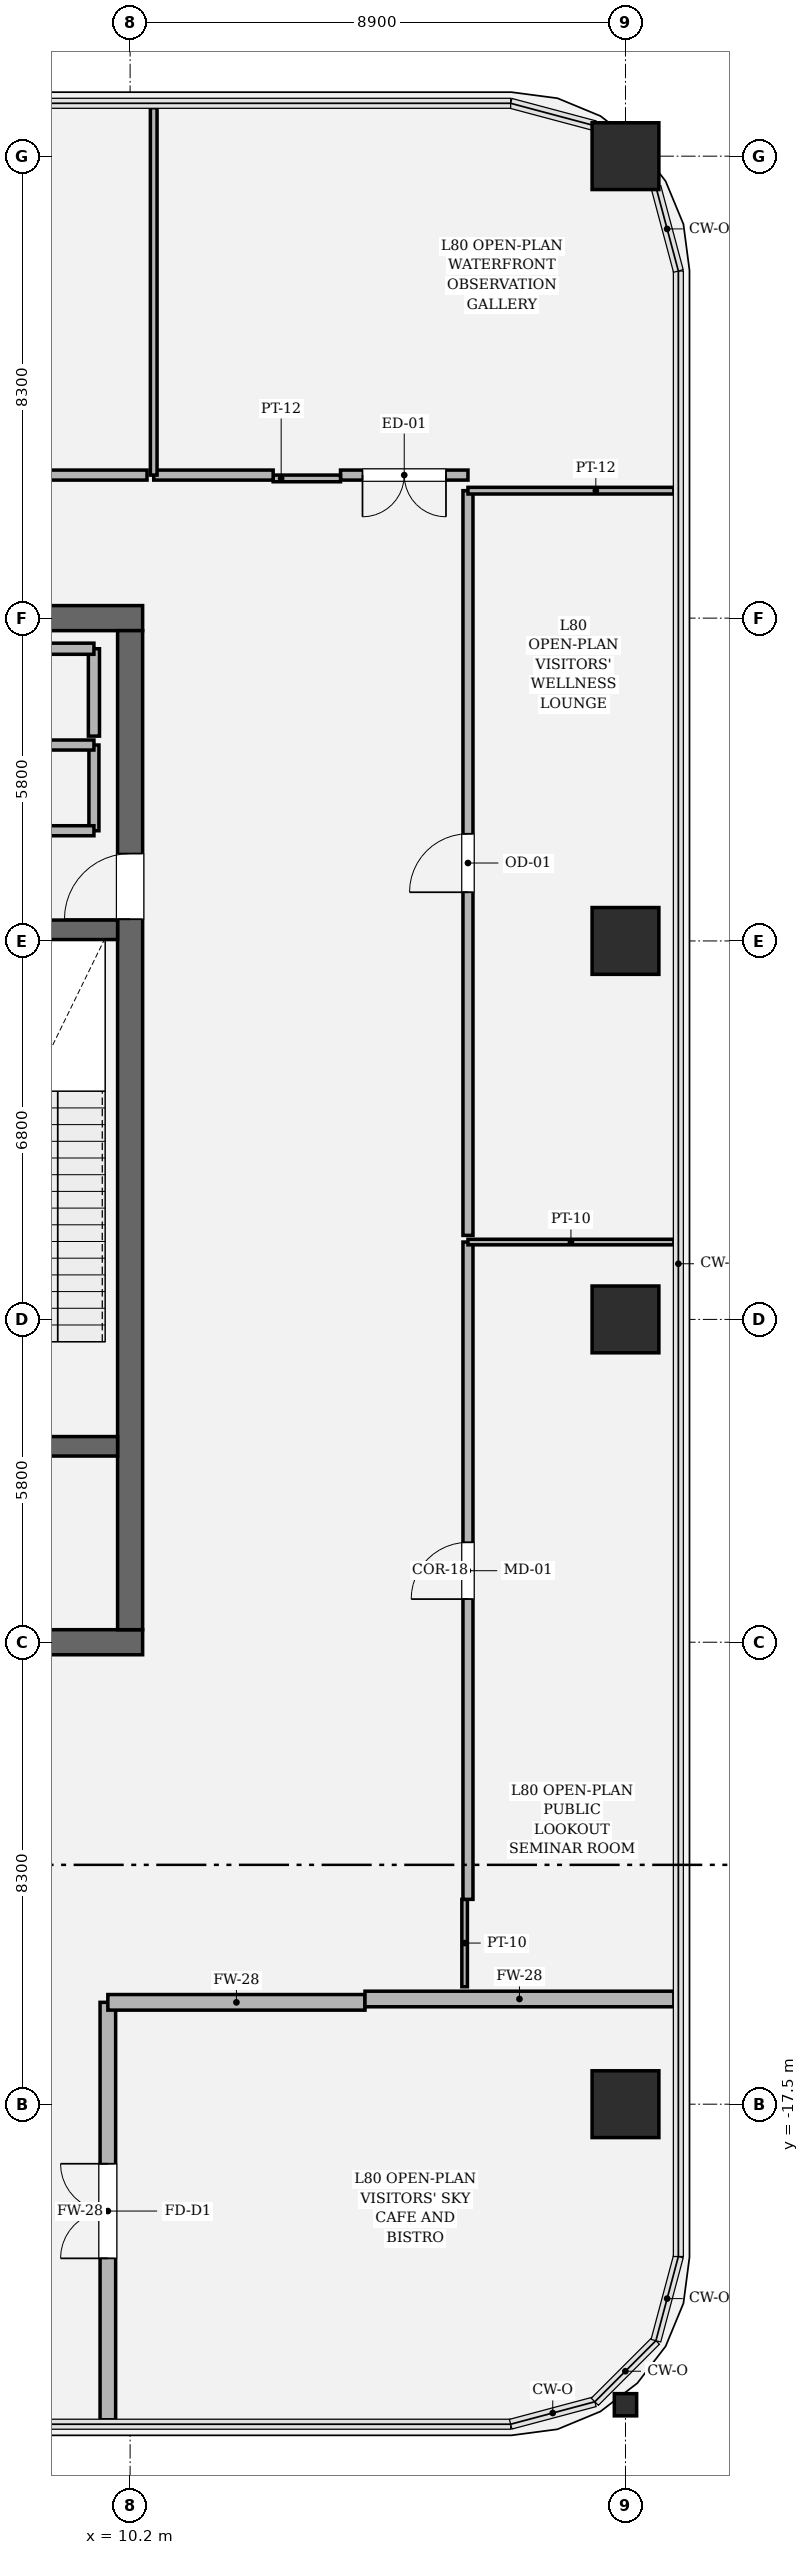
"""IFC4 building model, lengths in metres.
Left out: names, types, materials, properties, quantities, classifications, styles, units other than length and angle.
Written with IfcOpenShell. Run it as: python <this file> out.ifc"""

import sys

from ifc_helpers import new_model, si_unit, direction, frame, frame_2d, origin, origin_2d, place, context, subcontext, project, spatial, rectangle, hollow_rectangle, i_section, extrude, element, fill, save


model = new_model("IFC4")
c1 = context("Model", 3, precision=1e-05, world=origin(), true_north=direction((0.0, 1.0)))
c2 = subcontext(c1, "Body", "Model", "MODEL_VIEW")
j1 = project(units=[si_unit("LENGTHUNIT", "METRE"), si_unit("PLANEANGLEUNIT", "RADIAN")], contexts=[c1])
p1 = place(None, origin())
s1 = spatial("IfcSite", under=j1, at=p1, CompositionType="ELEMENT")
p2 = place(p1, origin())
s2 = spatial("IfcBuilding", under=s1, at=p2, CompositionType="ELEMENT")
p3 = place(p2, frame((0.0, 0.0, 339.0)))
s3 = spatial("IfcBuildingStorey", under=s2, at=p3, CompositionType="ELEMENT", Elevation=339.0)
p4 = place(p3, frame((10.425, -9.2, 0.0), z_axis=(0.0, 0.0, 1.0), x_axis=(-1.0, 0.0, 0.0)))
e1 = element("IfcWall", 1, at=p4, inside=s3, PredefinedType="SHEAR", context=c2, shape_type="SweptSolid", body=[
    extrude(rectangle(XDim=20.85, YDim=0.45, at=frame_2d((10.425, 0.0))), origin(), (0.0, 0.0, 1.0), 4.8),
])
p5 = place(p4, frame((2.7, 0.0, 0.0)))
e2 = element("IfcOpeningElement", 2, at=p5, cuts=e1, PredefinedType="OPENING", context=c2, shape_type="SweptSolid", body=[
    extrude(rectangle(XDim=1.25, YDim=2.25, at=frame_2d((0.625, 1.125))), frame((0.0, 0.235, 0.0), z_axis=(0.0, -1.0, 0.0), x_axis=(1.0, 0.0, 0.0)), (0.0, 0.0, 1.0), 0.47),
])
p6 = place(p4, frame((16.9, 0.0, 0.0)))
e3 = element("IfcOpeningElement", 3, at=p6, cuts=e1, PredefinedType="OPENING", context=c2, shape_type="SweptSolid", body=[
    extrude(rectangle(XDim=1.25, YDim=2.25, at=frame_2d((0.625, 1.125))), frame((0.0, 0.235, 0.0), z_axis=(0.0, -1.0, 0.0), x_axis=(1.0, 0.0, 0.0)), (0.0, 0.0, 1.0), 0.47),
])
p7 = place(p4, frame((10.925, 0.0, 0.0)))
e4 = element("IfcOpeningElement", 4, at=p7, cuts=e1, PredefinedType="OPENING", context=c2, shape_type="SweptSolid", body=[
    extrude(rectangle(XDim=1.2, YDim=2.3, at=frame_2d((0.6, 1.15))), frame((0.0, 0.235, 0.0), z_axis=(0.0, -1.0, 0.0), x_axis=(1.0, 0.0, 0.0)), (0.0, 0.0, 1.0), 0.47),
])
p8 = place(p4, frame((8.725, 0.0, 0.0)))
e5 = element("IfcOpeningElement", 5, at=p8, cuts=e1, PredefinedType="OPENING", context=c2, shape_type="SweptSolid", body=[
    extrude(rectangle(XDim=1.2, YDim=2.3, at=frame_2d((0.6, 1.15))), frame((0.0, 0.235, 0.0), z_axis=(0.0, -1.0, 0.0), x_axis=(1.0, 0.0, 0.0)), (0.0, 0.0, 1.0), 0.47),
])
p9 = place(p3, frame((-10.425, 9.2, 0.0), z_axis=(0.0, 0.0, 1.0), x_axis=(1.0, 0.0, 0.0)))
e6 = element("IfcWall", 6, at=p9, inside=s3, PredefinedType="SHEAR", context=c2, shape_type="SweptSolid", body=[
    extrude(rectangle(XDim=20.85, YDim=0.45, at=frame_2d((10.425, 0.0))), origin(), (0.0, 0.0, 1.0), 4.8),
])
p10 = place(p3, frame((10.2, 8.975, 0.0), z_axis=(0.0, 0.0, 1.0), x_axis=(0.0, -1.0, 0.0)))
e7 = element("IfcWall", 7, at=p10, inside=s3, PredefinedType="SHEAR", context=c2, shape_type="SweptSolid", body=[
    extrude(rectangle(XDim=17.95, YDim=0.45, at=frame_2d((8.975, 0.0))), origin(), (0.0, 0.0, 1.0), 4.8),
])
p11 = place(p10, frame((4.005, 0.0, 0.0)))
e8 = element("IfcOpeningElement", 8, at=p11, cuts=e7, PredefinedType="OPENING", context=c2, shape_type="SweptSolid", body=[
    extrude(rectangle(XDim=1.18, YDim=2.2, at=frame_2d((0.59, 1.1))), frame((0.0, 0.235, 0.0), z_axis=(0.0, -1.0, 0.0), x_axis=(1.0, 0.0, 0.0)), (0.0, 0.0, 1.0), 0.47),
])
p12 = place(p3, frame((4.65, -5.68, 0.0), z_axis=(0.0, 0.0, 1.0), x_axis=(1.0, 0.0, 0.0)))
e9 = element("IfcWall", 9, at=p12, inside=s3, PredefinedType="SOLIDWALL", context=c2, shape_type="SweptSolid", body=[
    extrude(rectangle(XDim=5.325, YDim=0.35, at=frame_2d((2.663, 0.0))), origin(), (0.0, 0.0, 1.0), 4.8),
])
p13 = place(p12, frame((2.71, 0.0, 0.0)))
e10 = element("IfcOpeningElement", 10, at=p13, cuts=e9, PredefinedType="OPENING", context=c2, shape_type="SweptSolid", body=[
    extrude(rectangle(XDim=1.18, YDim=2.2, at=frame_2d((0.59, 1.1))), frame((0.0, 0.185, 0.0), z_axis=(0.0, -1.0, 0.0), x_axis=(1.0, 0.0, 0.0)), (0.0, 0.0, 1.0), 0.37),
])
p14 = place(p3, frame((4.65, 3.6, 0.0), z_axis=(0.0, 0.0, 1.0), x_axis=(1.0, 0.0, 0.0)))
e11 = element("IfcWall", 11, at=p14, inside=s3, PredefinedType="SOLIDWALL", context=c2, shape_type="SweptSolid", body=[
    extrude(rectangle(XDim=5.325, YDim=0.35, at=frame_2d((2.663, 0.0))), origin(), (0.0, 0.0, 1.0), 4.8),
])
for number, where, z_axis, x_axis in (
    (12, (19.1, -17.5, 0.0), (0.0, 0.0, 1.0), (1.0, 0.0, 0.0)),
    (13, (19.1, -3.4, 0.0), (0.0, 0.0, 1.0), (1.0, 0.0, 0.0)),
    (14, (19.1, 3.4, 0.0), (0.0, 0.0, 1.0), (1.0, 0.0, 0.0)),
    (15, (19.1, 17.5, 0.0), (0.0, 0.0, 1.0), (1.0, 0.0, 0.0)),
):
    element("IfcColumn", number, at=place(p3, frame(where, z_axis=z_axis, x_axis=x_axis)), inside=s3, PredefinedType="COLUMN", context=c2, shape_type="SweptSolid", body=[
        extrude(hollow_rectangle(XDim=1.2, YDim=1.2, WallThickness=0.035, at=origin_2d()), origin(), (0.0, 0.0, 1.0), 4.8),
    ])
p15 = place(p3, frame((19.1, -22.9, 0.0), z_axis=(0.0, 0.0, 1.0), x_axis=(1.0, 0.0, 0.0)))
e16 = element("IfcColumn", 16, at=p15, inside=s3, PredefinedType="COLUMN", context=c2, shape_type="SweptSolid", body=[
    extrude(i_section(OverallWidth=0.401, OverallDepth=0.399, WebThickness=0.025, FlangeThickness=0.04, FilletRadius=0.018, at=origin_2d()), origin(), (0.0, 0.0, 1.0), 4.798),
])
p16 = place(p3, frame((9.55, 5.38, 0.0), z_axis=(0.0, 0.0, 1.0), x_axis=(0.0, 1.0, 0.0)))
e17 = element("IfcWall", 17, at=p16, inside=s3, PredefinedType="PARTITIONING", context=c2, shape_type="SweptSolid", body=[
    extrude(rectangle(XDim=1.54, YDim=0.18, at=frame_2d((0.77, 0.0))), origin(), (0.0, 0.0, 1.0), 4.52),
])
p17 = place(p3, frame((9.55, 6.92, 0.0), z_axis=(0.0, 0.0, 1.0), x_axis=(-1.0, 0.0, 0.0)))
e18 = element("IfcWall", 18, at=p17, inside=s3, PredefinedType="PARTITIONING", context=c2, shape_type="SweptSolid", body=[
    extrude(rectangle(XDim=4.5, YDim=0.18, at=frame_2d((2.25, 0.0))), origin(), (0.0, 0.0, 1.0), 4.52),
])
p18 = place(p17, frame((1.79, 0.0, 0.0)))
e19 = element("IfcOpeningElement", 19, at=p18, cuts=e18, PredefinedType="OPENING", context=c2, shape_type="SweptSolid", body=[
    extrude(rectangle(XDim=0.92, YDim=2.1, at=frame_2d((0.46, 1.05))), frame((0.0, 0.1, 0.0), z_axis=(0.0, -1.0, 0.0), x_axis=(1.0, 0.0, 0.0)), (0.0, 0.0, 1.0), 0.2),
])
p19 = place(p3, frame((5.05, 5.38, 0.0), z_axis=(0.0, 0.0, 1.0), x_axis=(1.0, 0.0, 0.0)))
e20 = element("IfcWall", 20, at=p19, inside=s3, PredefinedType="PARTITIONING", context=c2, shape_type="SweptSolid", body=[
    extrude(rectangle(XDim=4.5, YDim=0.18, at=frame_2d((2.25, 0.0))), origin(), (0.0, 0.0, 1.0), 4.52),
])
p20 = place(p19, frame((1.725, 0.0, 0.0)))
e21 = element("IfcOpeningElement", 21, at=p20, cuts=e20, PredefinedType="OPENING", context=c2, shape_type="SweptSolid", body=[
    extrude(rectangle(XDim=1.05, YDim=2.2, at=frame_2d((0.525, 1.1))), frame((0.0, 0.1, 0.0), z_axis=(0.0, -1.0, 0.0), x_axis=(1.0, 0.0, 0.0)), (0.0, 0.0, 1.0), 0.2),
])
p21 = place(p3, frame((9.55, 7.08, 0.0), z_axis=(0.0, 0.0, 1.0), x_axis=(0.0, 1.0, 0.0)))
e22 = element("IfcWall", 22, at=p21, inside=s3, PredefinedType="SOLIDWALL", context=c2, shape_type="SweptSolid", body=[
    extrude(rectangle(XDim=1.57, YDim=0.2, at=frame_2d((0.785, 0.0))), origin(), (0.0, 0.0, 1.0), 4.52),
])
p22 = place(p3, frame((9.55, 8.65, 0.0), z_axis=(0.0, 0.0, 1.0), x_axis=(-1.0, 0.0, 0.0)))
e23 = element("IfcWall", 23, at=p22, inside=s3, PredefinedType="SOLIDWALL", context=c2, shape_type="SweptSolid", body=[
    extrude(rectangle(XDim=4.5, YDim=0.2, at=frame_2d((2.25, 0.0))), origin(), (0.0, 0.0, 1.0), 4.52),
])
p23 = place(p3, frame((9.8, -23.17, 0.0), z_axis=(0.0, 0.0, 1.0), x_axis=(0.0, 1.0, 0.0)))
e24 = element("IfcWall", 24, at=p23, inside=s3, PredefinedType="SOLIDWALL", context=c2, shape_type="SweptSolid", body=[
    extrude(rectangle(XDim=7.5, YDim=0.28, at=frame_2d((3.75, 0.0))), origin(), (0.0, 0.0, 1.0), 3.194),
])
p24 = place(p23, frame((2.9, 0.0, 0.0)))
e25 = element("IfcOpeningElement", 25, at=p24, cuts=e24, PredefinedType="OPENING", context=c2, shape_type="SweptSolid", body=[
    extrude(rectangle(XDim=1.7, YDim=2.3, at=frame_2d((0.85, 1.15))), frame((0.0, 0.15, 0.0), z_axis=(0.0, -1.0, 0.0), x_axis=(1.0, 0.0, 0.0)), (0.0, 0.0, 1.0), 0.3),
])
p25 = place(p3, frame((9.8, -15.67, 0.0), z_axis=(0.0, 0.0, 1.0), x_axis=(1.0, 0.0, 0.0)))
e26 = element("IfcWall", 26, at=p25, inside=s3, PredefinedType="SOLIDWALL", context=c2, shape_type="SweptSolid", body=[
    extrude(rectangle(XDim=4.62, YDim=0.28, at=frame_2d((2.31, 0.0))), origin(), (0.0, 0.0, 1.0), 3.194),
])
p26 = place(p3, frame((14.42, -15.61, 0.0), z_axis=(0.0, 0.0, 1.0), x_axis=(1.0, 0.0, 0.0)))
e27 = element("IfcWall", 27, at=p26, inside=s3, PredefinedType="SOLIDWALL", context=c2, shape_type="SweptSolid", body=[
    extrude(rectangle(XDim=5.55, YDim=0.28, at=frame_2d((2.775, 0.0))), origin(), (0.0, 0.0, 1.0), 3.194),
])
p27 = place(p3, frame((16.21, -15.39, 0.0), z_axis=(0.0, 0.0, 1.0), x_axis=(0.0, 1.0, 0.0)))
e28 = element("IfcWall", 28, at=p27, inside=s3, PredefinedType="PARTITIONING", context=c2, shape_type="SweptSolid", body=[
    extrude(rectangle(XDim=1.57, YDim=0.1, at=frame_2d((0.785, 0.0))), origin(), (0.0, 0.0, 1.0), 4.52),
])
p28 = place(p3, frame((16.27, -13.82, 0.0), z_axis=(0.0, 0.0, 1.0), x_axis=(0.0, 1.0, 0.0)))
e29 = element("IfcWall", 29, at=p28, inside=s3, PredefinedType="PARTITIONING", context=c2, shape_type="SweptSolid", body=[
    extrude(rectangle(XDim=11.81, YDim=0.18, at=frame_2d((5.905, 0.0))), origin(), (0.0, 0.0, 1.0), 3.194),
])
p29 = place(p28, frame((5.395, 0.0, 0.0)))
e30 = element("IfcOpeningElement", 30, at=p29, cuts=e29, PredefinedType="OPENING", context=c2, shape_type="SweptSolid", body=[
    extrude(rectangle(XDim=1.02, YDim=2.2, at=frame_2d((0.51, 1.1))), frame((0.0, 0.1, 0.0), z_axis=(0.0, -1.0, 0.0), x_axis=(1.0, 0.0, 0.0)), (0.0, 0.0, 1.0), 0.2),
])
p30 = place(p3, frame((16.27, -2.01, 0.0), z_axis=(0.0, 0.0, 1.0), x_axis=(1.0, 0.0, 0.0)))
e31 = element("IfcWall", 31, at=p30, inside=s3, PredefinedType="PARTITIONING", context=c2, shape_type="SweptSolid", body=[
    extrude(rectangle(XDim=3.7, YDim=0.1, at=frame_2d((1.85, 0.0))), origin(), (0.0, 0.0, 1.0), 3.194),
])
p31 = place(p3, frame((16.27, -1.89, 0.0), z_axis=(0.0, 0.0, 1.0), x_axis=(0.0, 1.0, 0.0)))
e32 = element("IfcWall", 32, at=p31, inside=s3, PredefinedType="PARTITIONING", context=c2, shape_type="SweptSolid", body=[
    extrude(rectangle(XDim=13.38, YDim=0.18, at=frame_2d((6.69, 0.0))), origin(), (0.0, 0.0, 1.0), 3.194),
])
p32 = place(p31, frame((6.165, 0.0, 0.0)))
e33 = element("IfcOpeningElement", 33, at=p32, cuts=e32, PredefinedType="OPENING", context=c2, shape_type="SweptSolid", body=[
    extrude(rectangle(XDim=1.05, YDim=2.2, at=frame_2d((0.525, 1.1))), frame((0.0, 0.1, 0.0), z_axis=(0.0, -1.0, 0.0), x_axis=(1.0, 0.0, 0.0)), (0.0, 0.0, 1.0), 0.2),
])
p33 = place(p3, frame((16.27, 11.49, 0.0), z_axis=(0.0, 0.0, 1.0), x_axis=(1.0, 0.0, 0.0)))
e34 = element("IfcWall", 34, at=p33, inside=s3, PredefinedType="PARTITIONING", context=c2, shape_type="SweptSolid", body=[
    extrude(rectangle(XDim=3.7, YDim=0.12, at=frame_2d((1.85, 0.0))), origin(), (0.0, 0.0, 1.0), 3.194),
])
p34 = place(p3, frame((16.27, 11.77, 0.0), z_axis=(0.0, 0.0, 1.0), x_axis=(-1.0, 0.0, 0.0)))
e35 = element("IfcWall", 35, at=p34, inside=s3, PredefinedType="PARTITIONING", context=c2, shape_type="SweptSolid", body=[
    extrude(rectangle(XDim=2.29, YDim=0.18, at=frame_2d((1.145, 0.0))), origin(), (0.0, 0.0, 1.0), 4.52),
])
p35 = place(p34, frame((0.395, 0.0, 0.0)))
e36 = element("IfcOpeningElement", 36, at=p35, cuts=e35, PredefinedType="OPENING", context=c2, shape_type="SweptSolid", body=[
    extrude(rectangle(XDim=1.5, YDim=2.3, at=frame_2d((0.75, 1.15))), frame((0.0, 0.1, 0.0), z_axis=(0.0, -1.0, 0.0), x_axis=(1.0, 0.0, 0.0)), (0.0, 0.0, 1.0), 0.2),
])
p36 = place(p3, frame((13.98, 11.71, 0.0), z_axis=(0.0, 0.0, 1.0), x_axis=(-1.0, 0.0, 0.0)))
e37 = element("IfcWall", 37, at=p36, inside=s3, PredefinedType="PARTITIONING", context=c2, shape_type="SweptSolid", body=[
    extrude(rectangle(XDim=1.21, YDim=0.12, at=frame_2d((0.605, 0.0))), origin(), (0.0, 0.0, 1.0), 4.52),
])
p37 = place(p3, frame((12.77, 11.77, 0.0), z_axis=(0.0, 0.0, 1.0), x_axis=(-1.0, 0.0, 0.0)))
e38 = element("IfcWall", 38, at=p37, inside=s3, PredefinedType="PARTITIONING", context=c2, shape_type="SweptSolid", body=[
    extrude(rectangle(XDim=2.146, YDim=0.18, at=frame_2d((1.073, 0.0))), origin(), (0.0, 0.0, 1.0), 4.52),
])
p38 = place(p3, frame((10.624, 11.77, 0.0), z_axis=(0.0, 0.0, 1.0), x_axis=(0.0, 1.0, 0.0)))
e39 = element("IfcWall", 39, at=p38, inside=s3, PredefinedType="PARTITIONING", context=c2, shape_type="SweptSolid", body=[
    extrude(rectangle(XDim=6.6, YDim=0.12, at=frame_2d((3.3, 0.0))), origin(), (0.0, 0.0, 1.0), 3.194),
])
p39 = place(p3, frame((10.504, 11.77, 0.0), z_axis=(0.0, 0.0, 1.0), x_axis=(-1.0, 0.0, 0.0)))
e40 = element("IfcWall", 40, at=p39, inside=s3, PredefinedType="PARTITIONING", context=c2, shape_type="SweptSolid", body=[
    extrude(rectangle(XDim=12.844, YDim=0.18, at=frame_2d((6.422, 0.0))), origin(), (0.0, 0.0, 1.0), 3.194),
])
p40 = place(p39, frame((5.722, 0.0, 0.0)))
e41 = element("IfcOpeningElement", 41, at=p40, cuts=e40, PredefinedType="OPENING", context=c2, shape_type="SweptSolid", body=[
    extrude(rectangle(XDim=1.4, YDim=2.25, at=frame_2d((0.7, 1.125))), frame((0.0, 0.1, 0.0), z_axis=(0.0, -1.0, 0.0), x_axis=(1.0, 0.0, 0.0)), (0.0, 0.0, 1.0), 0.2),
])
p41 = place(p11, origin())
e42 = element("IfcDoor", 42, at=p41, inside=s3, OperationType="SINGLE_SWING_RIGHT", PredefinedType="DOOR", context=c2, shape_type="SweptSolid", body=[
    extrude(rectangle(XDim=1.18, YDim=2.2, at=frame_2d((0.59, 1.1))), frame((0.0, 0.025, 0.0), z_axis=(0.0, -1.0, 0.0), x_axis=(1.0, 0.0, 0.0)), (0.0, 0.0, 1.0), 0.05),
])
fill(e8, e42)
p42 = place(p24, origin())
e43 = element("IfcDoor", 43, at=p42, inside=s3, OperationType="DOUBLE_DOOR_SINGLE_SWING", PredefinedType="DOOR", context=c2, shape_type="SweptSolid", body=[
    extrude(rectangle(XDim=1.7, YDim=2.3, at=frame_2d((0.85, 1.15))), frame((0.0, 0.025, 0.0), z_axis=(0.0, -1.0, 0.0), x_axis=(1.0, 0.0, 0.0)), (0.0, 0.0, 1.0), 0.05),
])
fill(e25, e43)
p43 = place(p29, origin())
e44 = element("IfcDoor", 44, at=p43, inside=s3, OperationType="SINGLE_SWING_LEFT", PredefinedType="DOOR", context=c2, shape_type="SweptSolid", body=[
    extrude(rectangle(XDim=1.02, YDim=2.2, at=frame_2d((0.51, 1.1))), frame((0.0, 0.025, 0.0), z_axis=(0.0, -1.0, 0.0), x_axis=(1.0, 0.0, 0.0)), (0.0, 0.0, 1.0), 0.05),
])
fill(e30, e44)
p44 = place(p32, origin())
e45 = element("IfcDoor", 45, at=p44, inside=s3, OperationType="SINGLE_SWING_LEFT", PredefinedType="DOOR", context=c2, shape_type="SweptSolid", body=[
    extrude(rectangle(XDim=1.05, YDim=2.2, at=frame_2d((0.525, 1.1))), frame((0.0, 0.025, 0.0), z_axis=(0.0, -1.0, 0.0), x_axis=(1.0, 0.0, 0.0)), (0.0, 0.0, 1.0), 0.05),
])
fill(e33, e45)
p45 = place(p35, origin())
e46 = element("IfcDoor", 46, at=p45, inside=s3, OperationType="DOUBLE_DOOR_SINGLE_SWING", PredefinedType="DOOR", context=c2, shape_type="SweptSolid", body=[
    extrude(rectangle(XDim=1.5, YDim=2.3, at=frame_2d((0.75, 1.15))), frame((0.0, 0.025, 0.0), z_axis=(0.0, -1.0, 0.0), x_axis=(1.0, 0.0, 0.0)), (0.0, 0.0, 1.0), 0.05),
])
fill(e36, e46)
save(model, sys.argv[1])
